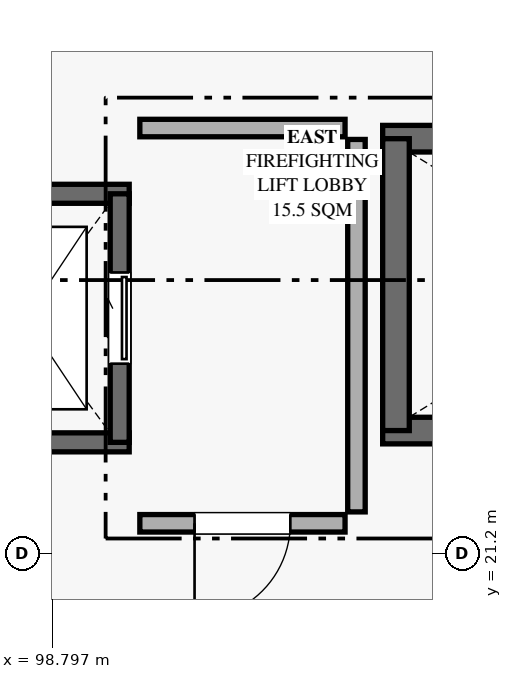
"""IFC4 building model, lengths in metres.
Left out: names, types, materials, properties, quantities, classifications, styles, units other than length and angle.
Written with IfcOpenShell. Run it as: python <this file> out.ifc"""

import sys

from ifc_helpers import new_model, si_unit, direction, frame, frame_2d, origin, place, context, subcontext, project, spatial, rectangle, extrude, element, fill, save


model = new_model("IFC4")
c1 = context("Model", 3, precision=1e-05, world=origin(), true_north=direction((0.0, 1.0)))
c2 = subcontext(c1, "Body", "Model", "MODEL_VIEW")
j1 = project(units=[si_unit("LENGTHUNIT", "METRE"), si_unit("PLANEANGLEUNIT", "RADIAN")], contexts=[c1])
p1 = place(None, origin())
s1 = spatial("IfcSite", under=j1, at=p1, CompositionType="ELEMENT")
p2 = place(p1, origin())
s2 = spatial("IfcBuilding", under=s1, at=p2, CompositionType="ELEMENT")
p3 = place(p2, frame((0.0, 0.0, 15.12)))
s3 = spatial("IfcBuildingStorey", under=s2, at=p3, CompositionType="ELEMENT", Elevation=15.12)
for number, where, z_axis, x_axis in (
    (1, (111.155, 22.82, 0.0), (0.0, 0.0, 1.0), (-1.0, 0.0, 0.0)),
    (2, (103.145, 26.66, 0.0), (0.0, 0.0, 1.0), (1.0, 0.0, 0.0)),
):
    element("IfcWall", number, at=place(p3, frame(where, z_axis=z_axis, x_axis=x_axis)), inside=s3, PredefinedType="SHEAR", context=c2, shape_type="SweptSolid", body=[
        extrude(rectangle(XDim=8.01, YDim=0.35, at=frame_2d((4.005, 0.0))), origin(), (0.0, 0.0, 1.0), 4.41),
    ])
p4 = place(p3, frame((103.32, 22.82, 0.0), z_axis=(0.0, 0.0, 1.0), x_axis=(0.0, 1.0, 0.0)))
e3 = element("IfcWall", 3, at=p4, inside=s3, PredefinedType="SHEAR", context=c2, shape_type="SweptSolid", body=[
    extrude(rectangle(XDim=3.84, YDim=0.35, at=frame_2d((1.92, 0.0))), origin(), (0.0, 0.0, 1.0), 4.41),
])
for number, where, z_axis, x_axis in (
    (4, (99.81, 22.665, 0.0), (0.0, 0.0, 1.0), (-1.0, 0.0, 0.0)),
    (5, (97.09, 25.935, 0.0), (0.0, 0.0, 1.0), (1.0, 0.0, 0.0)),
):
    element("IfcWall", number, at=place(p3, frame(where, z_axis=z_axis, x_axis=x_axis)), inside=s3, PredefinedType="SHEAR", context=c2, shape_type="SweptSolid", body=[
        extrude(rectangle(XDim=2.72, YDim=0.25, at=frame_2d((1.36, 0.0))), origin(), (0.0, 0.0, 1.0), 4.41),
    ])
p5 = place(p3, frame((99.685, 25.935, 0.0), z_axis=(0.0, 0.0, 1.0), x_axis=(0.0, -1.0, 0.0)))
e6 = element("IfcWall", 6, at=p5, inside=s3, PredefinedType="SHEAR", context=c2, shape_type="SweptSolid", body=[
    extrude(rectangle(XDim=3.27, YDim=0.25, at=frame_2d((1.635, 0.0))), origin(), (0.0, 0.0, 1.0), 4.41),
])
p6 = place(p5, frame((1.035, 0.0, 0.0)))
e7 = element("IfcOpeningElement", 7, at=p6, cuts=e6, PredefinedType="OPENING", context=c2, shape_type="SweptSolid", body=[
    extrude(rectangle(XDim=1.2, YDim=2.25, at=frame_2d((0.6, 1.125))), frame((0.0, 0.135, 0.0), z_axis=(0.0, -1.0, 0.0), x_axis=(1.0, 0.0, 0.0)), (0.0, 0.0, 1.0), 0.27),
])
p7 = place(p3, frame((102.65, 21.6, 0.0), z_axis=(0.0, 0.0, 1.0), x_axis=(-1.0, 0.0, 0.0)))
e8 = element("IfcWall", 8, at=p7, inside=s3, PredefinedType="PARTITIONING", context=c2, shape_type="SweptSolid", body=[
    extrude(rectangle(XDim=2.7, YDim=0.23, at=frame_2d((1.35, 0.0))), origin(), (0.0, 0.0, 1.0), 3.16),
])
p8 = place(p7, frame((0.72, 0.0, 0.0)))
e9 = element("IfcOpeningElement", 9, at=p8, cuts=e8, PredefinedType="OPENING", context=c2, shape_type="SweptSolid", body=[
    extrude(rectangle(XDim=1.26, YDim=2.12, at=frame_2d((0.63, 1.06))), frame((0.0, 0.125, 0.0), z_axis=(0.0, -1.0, 0.0), x_axis=(1.0, 0.0, 0.0)), (0.0, 0.0, 1.0), 0.25),
])
p9 = place(p3, frame((99.95, 26.8, 0.0), z_axis=(0.0, 0.0, 1.0), x_axis=(1.0, 0.0, 0.0)))
e10 = element("IfcWall", 10, at=p9, inside=s3, PredefinedType="PARTITIONING", context=c2, shape_type="SweptSolid", body=[
    extrude(rectangle(XDim=2.7, YDim=0.23, at=frame_2d((1.35, 0.0))), origin(), (0.0, 0.0, 1.0), 3.16),
])
p10 = place(p3, frame((102.8, 26.65, 0.0), z_axis=(0.0, 0.0, 1.0), x_axis=(0.0, -1.0, 0.0)))
e11 = element("IfcWall", 11, at=p10, inside=s3, PredefinedType="PARTITIONING", context=c2, shape_type="SweptSolid", body=[
    extrude(rectangle(XDim=4.9, YDim=0.23, at=frame_2d((2.45, 0.0))), origin(), (0.0, 0.0, 1.0), 3.16),
])
p11 = place(p6, origin())
e12 = element("IfcDoor", 12, at=p11, inside=s3, OperationType="SLIDING_TO_LEFT", PredefinedType="DOOR", context=c2, shape_type="SweptSolid", body=[
    extrude(rectangle(XDim=1.2, YDim=2.25, at=frame_2d((0.6, 1.125))), frame((0.0, 0.025, 0.0), z_axis=(0.0, -1.0, 0.0), x_axis=(1.0, 0.0, 0.0)), (0.0, 0.0, 1.0), 0.05),
])
fill(e7, e12)
p12 = place(p8, origin())
e13 = element("IfcDoor", 13, at=p12, inside=s3, OperationType="SINGLE_SWING_RIGHT", PredefinedType="DOOR", context=c2, shape_type="SweptSolid", body=[
    extrude(rectangle(XDim=1.26, YDim=2.12, at=frame_2d((0.63, 1.06))), frame((0.0, 0.025, 0.0), z_axis=(0.0, -1.0, 0.0), x_axis=(1.0, 0.0, 0.0)), (0.0, 0.0, 1.0), 0.05),
])
fill(e9, e13)
save(model, sys.argv[1])
